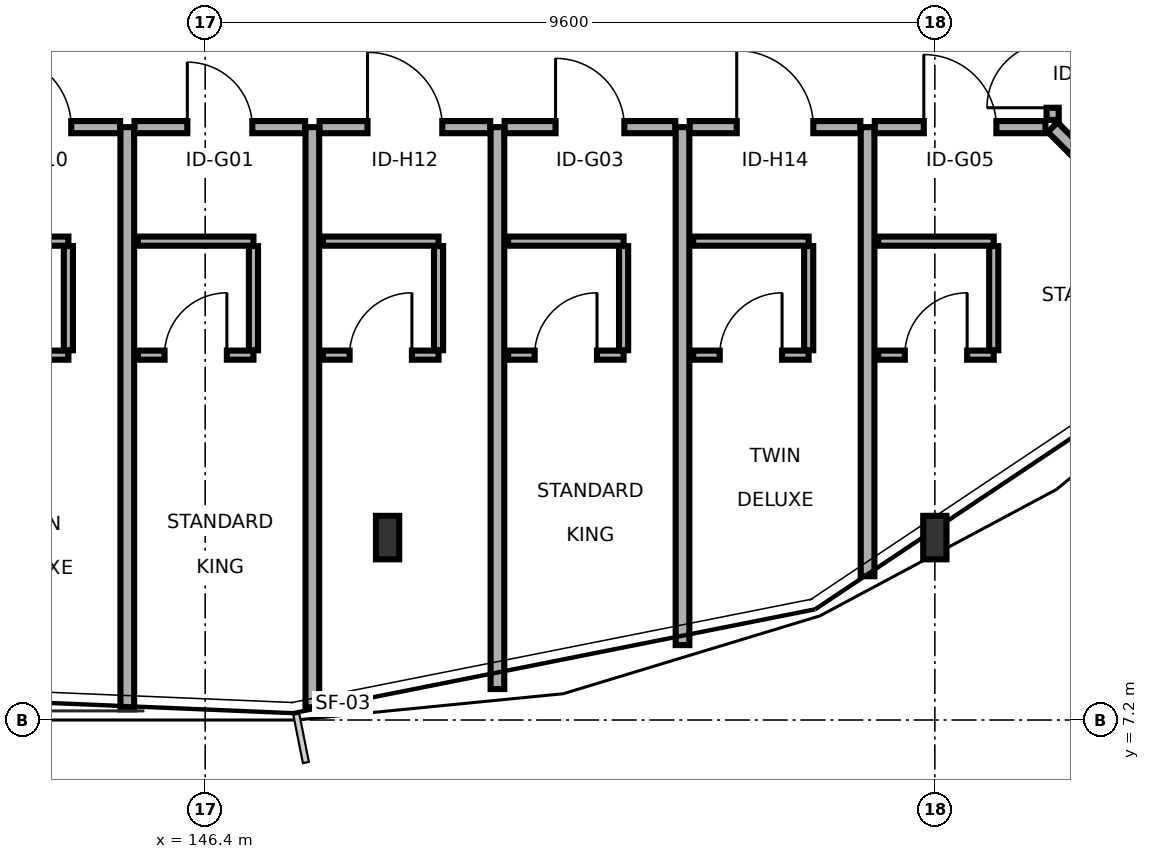
"""IFC4 building model, lengths in metres.
Left out: names, types, materials, properties, quantities, classifications, styles, units other than length and angle.
Written with IfcOpenShell. Run it as: python <this file> out.ifc"""

import sys

from ifc_helpers import new_model, si_unit, direction, frame, frame_2d, origin, origin_2d, place, context, subcontext, project, spatial, rectangle, i_section, extrude, element, fill, save


model = new_model("IFC4")
c1 = context("Model", 3, precision=1e-05, world=origin(), true_north=direction((0.0, 1.0)))
c2 = subcontext(c1, "Body", "Model", "MODEL_VIEW")
j1 = project(units=[si_unit("LENGTHUNIT", "METRE"), si_unit("PLANEANGLEUNIT", "RADIAN")], contexts=[c1])
p1 = place(None, origin())
s1 = spatial("IfcSite", under=j1, at=p1, CompositionType="ELEMENT")
p2 = place(p1, origin())
s2 = spatial("IfcBuilding", under=s1, at=p2, CompositionType="ELEMENT")
p3 = place(p2, frame((0.0, 0.0, 14.7)))
s3 = spatial("IfcBuildingStorey", under=s2, at=p3, CompositionType="ELEMENT", Elevation=14.7)
for number, where, z_axis, x_axis in (
    (1, (148.8, 9.6, 0.0), (0.0, 0.0, 1.0), (1.0, 0.0, 0.0)),
    (2, (156.0, 9.6, 0.0), (0.0, 0.0, 1.0), (1.0, 0.0, 0.0)),
):
    element("IfcColumn", number, at=place(p3, frame(where, z_axis=z_axis, x_axis=x_axis)), inside=s3, PredefinedType="COLUMN", context=c2, shape_type="SweptSolid", body=[
        extrude(i_section(OverallWidth=0.306, OverallDepth=0.572, WebThickness=0.021, FlangeThickness=0.04, FilletRadius=0.027, at=origin_2d()), origin(), (0.0, 0.0, 1.0), 3.4),
    ])
p4 = place(p3, frame((143.035, 15.0, 0.0), z_axis=(0.0, 0.0, 1.0), x_axis=(1.0, 0.0, 0.0)))
e3 = element("IfcWall", 3, at=p4, inside=s3, PredefinedType="PARTITIONING", context=c2, shape_type="SweptSolid", body=[
    extrude(rectangle(XDim=2.245, YDim=0.16, at=frame_2d((1.123, 0.0))), origin(), (0.0, 0.0, 1.0), 3.215),
])
p5 = place(p4, frame((0.643, 0.0, 0.0)))
e4 = element("IfcOpeningElement", 4, at=p5, cuts=e3, PredefinedType="OPENING", context=c2, shape_type="SweptSolid", body=[
    extrude(rectangle(XDim=0.96, YDim=2.13, at=frame_2d((0.48, 1.065))), frame((0.0, 0.09, 0.0), z_axis=(0.0, -1.0, 0.0), x_axis=(1.0, 0.0, 0.0)), (0.0, 0.0, 1.0), 0.18),
])
p6 = place(p3, frame((143.08, 12.0, 0.0), z_axis=(0.0, 0.0, 1.0), x_axis=(1.0, 0.0, 0.0)))
e5 = element("IfcWall", 5, at=p6, inside=s3, PredefinedType="PARTITIONING", context=c2, shape_type="SweptSolid", body=[
    extrude(rectangle(XDim=1.52, YDim=0.12, at=frame_2d((0.76, 0.0))), origin(), (0.0, 0.0, 1.0), 3.215),
])
p7 = place(p6, frame((0.35, 0.0, 0.0)))
e6 = element("IfcOpeningElement", 6, at=p7, cuts=e5, PredefinedType="OPENING", context=c2, shape_type="SweptSolid", body=[
    extrude(rectangle(XDim=0.82, YDim=2.08, at=frame_2d((0.41, 1.04))), frame((0.0, 0.07, 0.0), z_axis=(0.0, -1.0, 0.0), x_axis=(1.0, 0.0, 0.0)), (0.0, 0.0, 1.0), 0.14),
])
p8 = place(p3, frame((143.08, 13.5, 0.0), z_axis=(0.0, 0.0, 1.0), x_axis=(1.0, 0.0, 0.0)))
e7 = element("IfcWall", 7, at=p8, inside=s3, PredefinedType="PARTITIONING", context=c2, shape_type="SweptSolid", body=[
    extrude(rectangle(XDim=1.52, YDim=0.12, at=frame_2d((0.76, 0.0))), origin(), (0.0, 0.0, 1.0), 3.215),
])
p9 = place(p3, frame((144.6, 12.065, 0.0), z_axis=(0.0, 0.0, 1.0), x_axis=(0.0, 1.0, 0.0)))
e8 = element("IfcWall", 8, at=p9, inside=s3, PredefinedType="PARTITIONING", context=c2, shape_type="SweptSolid", body=[
    extrude(rectangle(XDim=1.37, YDim=0.12, at=frame_2d((0.685, 0.0))), origin(), (0.0, 0.0, 1.0), 3.215),
])
p10 = place(p3, frame((145.375, 7.34, 0.0), z_axis=(0.0, 0.0, 1.0), x_axis=(0.0, 1.0, 0.0)))
e9 = element("IfcWall", 9, at=p10, inside=s3, PredefinedType="PARTITIONING", context=c2, shape_type="SweptSolid", body=[
    extrude(rectangle(XDim=7.66, YDim=0.18, at=frame_2d((3.83, 0.0))), origin(), (0.0, 0.0, 1.0), 2.76),
])
p11 = place(p3, frame((145.47, 15.0, 0.0), z_axis=(0.0, 0.0, 1.0), x_axis=(1.0, 0.0, 0.0)))
e10 = element("IfcWall", 10, at=p11, inside=s3, PredefinedType="PARTITIONING", context=c2, shape_type="SweptSolid", body=[
    extrude(rectangle(XDim=2.245, YDim=0.16, at=frame_2d((1.123, 0.0))), origin(), (0.0, 0.0, 1.0), 3.215),
])
p12 = place(p11, frame((0.695, 0.0, 0.0)))
e11 = element("IfcOpeningElement", 11, at=p12, cuts=e10, PredefinedType="OPENING", context=c2, shape_type="SweptSolid", body=[
    extrude(rectangle(XDim=0.855, YDim=2.05, at=frame_2d((0.427, 1.025))), frame((0.0, 0.09, 0.0), z_axis=(0.0, -1.0, 0.0), x_axis=(1.0, 0.0, 0.0)), (0.0, 0.0, 1.0), 0.18),
])
p13 = place(p3, frame((145.515, 12.0, 0.0), z_axis=(0.0, 0.0, 1.0), x_axis=(1.0, 0.0, 0.0)))
e12 = element("IfcWall", 12, at=p13, inside=s3, PredefinedType="PARTITIONING", context=c2, shape_type="SweptSolid", body=[
    extrude(rectangle(XDim=1.52, YDim=0.12, at=frame_2d((0.76, 0.0))), origin(), (0.0, 0.0, 1.0), 3.215),
])
p14 = place(p13, frame((0.35, 0.0, 0.0)))
e13 = element("IfcOpeningElement", 13, at=p14, cuts=e12, PredefinedType="OPENING", context=c2, shape_type="SweptSolid", body=[
    extrude(rectangle(XDim=0.82, YDim=2.08, at=frame_2d((0.41, 1.04))), frame((0.0, 0.07, 0.0), z_axis=(0.0, -1.0, 0.0), x_axis=(1.0, 0.0, 0.0)), (0.0, 0.0, 1.0), 0.14),
])
p15 = place(p3, frame((145.515, 13.5, 0.0), z_axis=(0.0, 0.0, 1.0), x_axis=(1.0, 0.0, 0.0)))
e14 = element("IfcWall", 14, at=p15, inside=s3, PredefinedType="PARTITIONING", context=c2, shape_type="SweptSolid", body=[
    extrude(rectangle(XDim=1.52, YDim=0.12, at=frame_2d((0.76, 0.0))), origin(), (0.0, 0.0, 1.0), 3.215),
])
p16 = place(p3, frame((147.035, 12.065, 0.0), z_axis=(0.0, 0.0, 1.0), x_axis=(0.0, 1.0, 0.0)))
e15 = element("IfcWall", 15, at=p16, inside=s3, PredefinedType="PARTITIONING", context=c2, shape_type="SweptSolid", body=[
    extrude(rectangle(XDim=1.37, YDim=0.12, at=frame_2d((0.685, 0.0))), origin(), (0.0, 0.0, 1.0), 3.215),
])
p17 = place(p3, frame((147.81, 7.368, 0.0), z_axis=(0.0, 0.0, 1.0), x_axis=(0.0, 1.0, 0.0)))
e16 = element("IfcWall", 16, at=p17, inside=s3, PredefinedType="PARTITIONING", context=c2, shape_type="SweptSolid", body=[
    extrude(rectangle(XDim=7.632, YDim=0.18, at=frame_2d((3.816, 0.0))), origin(), (0.0, 0.0, 1.0), 2.76),
])
p18 = place(p3, frame((147.905, 15.0, 0.0), z_axis=(0.0, 0.0, 1.0), x_axis=(1.0, 0.0, 0.0)))
e17 = element("IfcWall", 17, at=p18, inside=s3, PredefinedType="PARTITIONING", context=c2, shape_type="SweptSolid", body=[
    extrude(rectangle(XDim=2.245, YDim=0.16, at=frame_2d((1.123, 0.0))), origin(), (0.0, 0.0, 1.0), 2.75),
])
p19 = place(p18, frame((0.631, 0.0, 0.0)))
e18 = element("IfcOpeningElement", 18, at=p19, cuts=e17, PredefinedType="OPENING", context=c2, shape_type="SweptSolid", body=[
    extrude(rectangle(XDim=0.984, YDim=2.07, at=frame_2d((0.492, 1.035))), frame((0.0, 0.09, 0.0), z_axis=(0.0, -1.0, 0.0), x_axis=(1.0, 0.0, 0.0)), (0.0, 0.0, 1.0), 0.18),
])
p20 = place(p3, frame((147.95, 12.0, 0.0), z_axis=(0.0, 0.0, 1.0), x_axis=(1.0, 0.0, 0.0)))
e19 = element("IfcWall", 19, at=p20, inside=s3, PredefinedType="PARTITIONING", context=c2, shape_type="SweptSolid", body=[
    extrude(rectangle(XDim=1.52, YDim=0.12, at=frame_2d((0.76, 0.0))), origin(), (0.0, 0.0, 1.0), 2.75),
])
p21 = place(p20, frame((0.35, 0.0, 0.0)))
e20 = element("IfcOpeningElement", 20, at=p21, cuts=e19, PredefinedType="OPENING", context=c2, shape_type="SweptSolid", body=[
    extrude(rectangle(XDim=0.82, YDim=2.08, at=frame_2d((0.41, 1.04))), frame((0.0, 0.07, 0.0), z_axis=(0.0, -1.0, 0.0), x_axis=(1.0, 0.0, 0.0)), (0.0, 0.0, 1.0), 0.14),
])
p22 = place(p3, frame((147.95, 13.5, 0.0), z_axis=(0.0, 0.0, 1.0), x_axis=(1.0, 0.0, 0.0)))
e21 = element("IfcWall", 21, at=p22, inside=s3, PredefinedType="PARTITIONING", context=c2, shape_type="SweptSolid", body=[
    extrude(rectangle(XDim=1.52, YDim=0.12, at=frame_2d((0.76, 0.0))), origin(), (0.0, 0.0, 1.0), 2.75),
])
p23 = place(p3, frame((149.47, 12.065, 0.0), z_axis=(0.0, 0.0, 1.0), x_axis=(0.0, 1.0, 0.0)))
e22 = element("IfcWall", 22, at=p23, inside=s3, PredefinedType="PARTITIONING", context=c2, shape_type="SweptSolid", body=[
    extrude(rectangle(XDim=1.37, YDim=0.12, at=frame_2d((0.685, 0.0))), origin(), (0.0, 0.0, 1.0), 3.215),
])
p24 = place(p3, frame((150.245, 7.607, 0.0), z_axis=(0.0, 0.0, 1.0), x_axis=(0.0, 1.0, 0.0)))
e23 = element("IfcWall", 23, at=p24, inside=s3, PredefinedType="PARTITIONING", context=c2, shape_type="SweptSolid", body=[
    extrude(rectangle(XDim=7.393, YDim=0.18, at=frame_2d((3.696, 0.0))), origin(), (0.0, 0.0, 1.0), 2.76),
])
p25 = place(p3, frame((150.34, 15.0, 0.0), z_axis=(0.0, 0.0, 1.0), x_axis=(1.0, 0.0, 0.0)))
e24 = element("IfcWall", 24, at=p25, inside=s3, PredefinedType="PARTITIONING", context=c2, shape_type="SweptSolid", body=[
    extrude(rectangle(XDim=2.245, YDim=0.16, at=frame_2d((1.123, 0.0))), origin(), (0.0, 0.0, 1.0), 3.215),
])
p26 = place(p25, frame((0.67, 0.0, 0.0)))
e25 = element("IfcOpeningElement", 25, at=p26, cuts=e24, PredefinedType="OPENING", context=c2, shape_type="SweptSolid", body=[
    extrude(rectangle(XDim=0.905, YDim=2.05, at=frame_2d((0.453, 1.025))), frame((0.0, 0.09, 0.0), z_axis=(0.0, -1.0, 0.0), x_axis=(1.0, 0.0, 0.0)), (0.0, 0.0, 1.0), 0.18),
])
p27 = place(p3, frame((150.385, 12.0, 0.0), z_axis=(0.0, 0.0, 1.0), x_axis=(1.0, 0.0, 0.0)))
e26 = element("IfcWall", 26, at=p27, inside=s3, PredefinedType="PARTITIONING", context=c2, shape_type="SweptSolid", body=[
    extrude(rectangle(XDim=1.52, YDim=0.12, at=frame_2d((0.76, 0.0))), origin(), (0.0, 0.0, 1.0), 3.215),
])
p28 = place(p27, frame((0.35, 0.0, 0.0)))
e27 = element("IfcOpeningElement", 27, at=p28, cuts=e26, PredefinedType="OPENING", context=c2, shape_type="SweptSolid", body=[
    extrude(rectangle(XDim=0.82, YDim=2.08, at=frame_2d((0.41, 1.04))), frame((0.0, 0.07, 0.0), z_axis=(0.0, -1.0, 0.0), x_axis=(1.0, 0.0, 0.0)), (0.0, 0.0, 1.0), 0.14),
])
p29 = place(p3, frame((150.385, 13.5, 0.0), z_axis=(0.0, 0.0, 1.0), x_axis=(1.0, 0.0, 0.0)))
e28 = element("IfcWall", 28, at=p29, inside=s3, PredefinedType="PARTITIONING", context=c2, shape_type="SweptSolid", body=[
    extrude(rectangle(XDim=1.52, YDim=0.12, at=frame_2d((0.76, 0.0))), origin(), (0.0, 0.0, 1.0), 3.215),
])
p30 = place(p3, frame((151.905, 12.065, 0.0), z_axis=(0.0, 0.0, 1.0), x_axis=(0.0, 1.0, 0.0)))
e29 = element("IfcWall", 29, at=p30, inside=s3, PredefinedType="PARTITIONING", context=c2, shape_type="SweptSolid", body=[
    extrude(rectangle(XDim=1.37, YDim=0.12, at=frame_2d((0.685, 0.0))), origin(), (0.0, 0.0, 1.0), 3.215),
])
p31 = place(p3, frame((152.68, 8.186, 0.0), z_axis=(0.0, 0.0, 1.0), x_axis=(0.0, 1.0, 0.0)))
e30 = element("IfcWall", 30, at=p31, inside=s3, PredefinedType="PARTITIONING", context=c2, shape_type="SweptSolid", body=[
    extrude(rectangle(XDim=6.814, YDim=0.18, at=frame_2d((3.407, 0.0))), origin(), (0.0, 0.0, 1.0), 2.76),
])
p32 = place(p3, frame((152.775, 15.0, 0.0), z_axis=(0.0, 0.0, 1.0), x_axis=(1.0, 0.0, 0.0)))
e31 = element("IfcWall", 31, at=p32, inside=s3, PredefinedType="PARTITIONING", context=c2, shape_type="SweptSolid", body=[
    extrude(rectangle(XDim=2.245, YDim=0.16, at=frame_2d((1.123, 0.0))), origin(), (0.0, 0.0, 1.0), 3.215),
])
p33 = place(p32, frame((0.618, 0.0, 0.0)))
e32 = element("IfcOpeningElement", 32, at=p33, cuts=e31, PredefinedType="OPENING", context=c2, shape_type="SweptSolid", body=[
    extrude(rectangle(XDim=1.008, YDim=2.13, at=frame_2d((0.504, 1.065))), frame((0.0, 0.09, 0.0), z_axis=(0.0, -1.0, 0.0), x_axis=(1.0, 0.0, 0.0)), (0.0, 0.0, 1.0), 0.18),
])
p34 = place(p3, frame((152.82, 12.0, 0.0), z_axis=(0.0, 0.0, 1.0), x_axis=(1.0, 0.0, 0.0)))
e33 = element("IfcWall", 33, at=p34, inside=s3, PredefinedType="PARTITIONING", context=c2, shape_type="SweptSolid", body=[
    extrude(rectangle(XDim=1.52, YDim=0.12, at=frame_2d((0.76, 0.0))), origin(), (0.0, 0.0, 1.0), 3.215),
])
p35 = place(p34, frame((0.35, 0.0, 0.0)))
e34 = element("IfcOpeningElement", 34, at=p35, cuts=e33, PredefinedType="OPENING", context=c2, shape_type="SweptSolid", body=[
    extrude(rectangle(XDim=0.82, YDim=2.08, at=frame_2d((0.41, 1.04))), frame((0.0, 0.07, 0.0), z_axis=(0.0, -1.0, 0.0), x_axis=(1.0, 0.0, 0.0)), (0.0, 0.0, 1.0), 0.14),
])
p36 = place(p3, frame((152.82, 13.5, 0.0), z_axis=(0.0, 0.0, 1.0), x_axis=(1.0, 0.0, 0.0)))
e35 = element("IfcWall", 35, at=p36, inside=s3, PredefinedType="PARTITIONING", context=c2, shape_type="SweptSolid", body=[
    extrude(rectangle(XDim=1.52, YDim=0.12, at=frame_2d((0.76, 0.0))), origin(), (0.0, 0.0, 1.0), 3.215),
])
p37 = place(p3, frame((154.34, 12.065, 0.0), z_axis=(0.0, 0.0, 1.0), x_axis=(0.0, 1.0, 0.0)))
e36 = element("IfcWall", 36, at=p37, inside=s3, PredefinedType="PARTITIONING", context=c2, shape_type="SweptSolid", body=[
    extrude(rectangle(XDim=1.37, YDim=0.12, at=frame_2d((0.685, 0.0))), origin(), (0.0, 0.0, 1.0), 3.215),
])
p38 = place(p3, frame((155.115, 9.092, 0.0), z_axis=(0.0, 0.0, 1.0), x_axis=(0.0, 1.0, 0.0)))
e37 = element("IfcWall", 37, at=p38, inside=s3, PredefinedType="PARTITIONING", context=c2, shape_type="SweptSolid", body=[
    extrude(rectangle(XDim=5.908, YDim=0.18, at=frame_2d((2.954, 0.0))), origin(), (0.0, 0.0, 1.0), 2.76),
])
p39 = place(p3, frame((155.21, 15.0, 0.0), z_axis=(0.0, 0.0, 1.0), x_axis=(1.0, 0.0, 0.0)))
e38 = element("IfcWall", 38, at=p39, inside=s3, PredefinedType="PARTITIONING", context=c2, shape_type="SweptSolid", body=[
    extrude(rectangle(XDim=2.245, YDim=0.16, at=frame_2d((1.123, 0.0))), origin(), (0.0, 0.0, 1.0), 2.75),
])
p40 = place(p39, frame((0.645, 0.0, 0.0)))
e39 = element("IfcOpeningElement", 39, at=p40, cuts=e38, PredefinedType="OPENING", context=c2, shape_type="SweptSolid", body=[
    extrude(rectangle(XDim=0.955, YDim=2.05, at=frame_2d((0.478, 1.025))), frame((0.0, 0.09, 0.0), z_axis=(0.0, -1.0, 0.0), x_axis=(1.0, 0.0, 0.0)), (0.0, 0.0, 1.0), 0.18),
])
p41 = place(p3, frame((155.255, 12.0, 0.0), z_axis=(0.0, 0.0, 1.0), x_axis=(1.0, 0.0, 0.0)))
e40 = element("IfcWall", 40, at=p41, inside=s3, PredefinedType="PARTITIONING", context=c2, shape_type="SweptSolid", body=[
    extrude(rectangle(XDim=1.52, YDim=0.12, at=frame_2d((0.76, 0.0))), origin(), (0.0, 0.0, 1.0), 2.75),
])
p42 = place(p41, frame((0.35, 0.0, 0.0)))
e41 = element("IfcOpeningElement", 41, at=p42, cuts=e40, PredefinedType="OPENING", context=c2, shape_type="SweptSolid", body=[
    extrude(rectangle(XDim=0.82, YDim=2.08, at=frame_2d((0.41, 1.04))), frame((0.0, 0.07, 0.0), z_axis=(0.0, -1.0, 0.0), x_axis=(1.0, 0.0, 0.0)), (0.0, 0.0, 1.0), 0.14),
])
p43 = place(p3, frame((155.255, 13.5, 0.0), z_axis=(0.0, 0.0, 1.0), x_axis=(1.0, 0.0, 0.0)))
e42 = element("IfcWall", 42, at=p43, inside=s3, PredefinedType="PARTITIONING", context=c2, shape_type="SweptSolid", body=[
    extrude(rectangle(XDim=1.52, YDim=0.12, at=frame_2d((0.76, 0.0))), origin(), (0.0, 0.0, 1.0), 2.75),
])
p44 = place(p3, frame((156.775, 12.065, 0.0), z_axis=(0.0, 0.0, 1.0), x_axis=(0.0, 1.0, 0.0)))
e43 = element("IfcWall", 43, at=p44, inside=s3, PredefinedType="PARTITIONING", context=c2, shape_type="SweptSolid", body=[
    extrude(rectangle(XDim=1.37, YDim=0.12, at=frame_2d((0.685, 0.0))), origin(), (0.0, 0.0, 1.0), 3.215),
])
p45 = place(p3, frame((157.55, 15.0, 0.0), z_axis=(0.0, 0.0, 1.0), x_axis=(0.707106781187, -0.707106781187, 0.0)))
e44 = element("IfcWall", 44, at=p45, inside=s3, PredefinedType="PARTITIONING", context=c2, shape_type="SweptSolid", body=[
    extrude(rectangle(XDim=3.565, YDim=0.18, at=frame_2d((1.783, 0.0))), origin(), (0.0, 0.0, 1.0), 2.76),
])
p46 = place(p3, frame((157.55, 15.095, 0.0), z_axis=(0.0, 0.0, 1.0), x_axis=(0.0, 1.0, 0.0)))
e45 = element("IfcWall", 45, at=p46, inside=s3, PredefinedType="PARTITIONING", context=c2, shape_type="SweptSolid", body=[
    extrude(rectangle(XDim=2.33, YDim=0.16, at=frame_2d((1.165, 0.0))), origin(), (0.0, 0.0, 1.0), 2.75),
])
p47 = place(p46, frame((0.16, 0.0, 0.0)))
e46 = element("IfcOpeningElement", 46, at=p47, cuts=e45, PredefinedType="OPENING", context=c2, shape_type="SweptSolid", body=[
    extrude(rectangle(XDim=0.864, YDim=2.13, at=frame_2d((0.432, 1.065))), frame((0.0, 0.09, 0.0), z_axis=(0.0, -1.0, 0.0), x_axis=(1.0, 0.0, 0.0)), (0.0, 0.0, 1.0), 0.18),
])
p48 = place(p5, origin())
e47 = element("IfcDoor", 47, at=p48, inside=s3, OperationType="SINGLE_SWING_LEFT", PredefinedType="DOOR", context=c2, shape_type="SweptSolid", body=[
    extrude(rectangle(XDim=0.96, YDim=2.13, at=frame_2d((0.48, 1.065))), frame((0.0, 0.025, 0.0), z_axis=(0.0, -1.0, 0.0), x_axis=(1.0, 0.0, 0.0)), (0.0, 0.0, 1.0), 0.05),
])
fill(e4, e47)
p49 = place(p12, origin())
e48 = element("IfcDoor", 48, at=p49, inside=s3, OperationType="SINGLE_SWING_LEFT", PredefinedType="DOOR", context=c2, shape_type="SweptSolid", body=[
    extrude(rectangle(XDim=0.855, YDim=2.05, at=frame_2d((0.427, 1.025))), frame((0.0, 0.025, 0.0), z_axis=(0.0, -1.0, 0.0), x_axis=(1.0, 0.0, 0.0)), (0.0, 0.0, 1.0), 0.05),
])
fill(e11, e48)
p50 = place(p14, origin())
e49 = element("IfcDoor", 49, at=p50, inside=s3, OperationType="SINGLE_SWING_RIGHT", PredefinedType="DOOR", context=c2, shape_type="SweptSolid", body=[
    extrude(rectangle(XDim=0.82, YDim=2.08, at=frame_2d((0.41, 1.04))), frame((0.0, 0.025, 0.0), z_axis=(0.0, -1.0, 0.0), x_axis=(1.0, 0.0, 0.0)), (0.0, 0.0, 1.0), 0.05),
])
fill(e13, e49)
p51 = place(p19, origin())
e50 = element("IfcDoor", 50, at=p51, inside=s3, OperationType="SINGLE_SWING_LEFT", PredefinedType="DOOR", context=c2, shape_type="SweptSolid", body=[
    extrude(rectangle(XDim=0.984, YDim=2.07, at=frame_2d((0.492, 1.035))), frame((0.0, 0.025, 0.0), z_axis=(0.0, -1.0, 0.0), x_axis=(1.0, 0.0, 0.0)), (0.0, 0.0, 1.0), 0.05),
])
fill(e18, e50)
p52 = place(p21, origin())
e51 = element("IfcDoor", 51, at=p52, inside=s3, OperationType="SINGLE_SWING_RIGHT", PredefinedType="DOOR", context=c2, shape_type="SweptSolid", body=[
    extrude(rectangle(XDim=0.82, YDim=2.08, at=frame_2d((0.41, 1.04))), frame((0.0, 0.025, 0.0), z_axis=(0.0, -1.0, 0.0), x_axis=(1.0, 0.0, 0.0)), (0.0, 0.0, 1.0), 0.05),
])
fill(e20, e51)
p53 = place(p26, origin())
e52 = element("IfcDoor", 52, at=p53, inside=s3, OperationType="SINGLE_SWING_LEFT", PredefinedType="DOOR", context=c2, shape_type="SweptSolid", body=[
    extrude(rectangle(XDim=0.905, YDim=2.05, at=frame_2d((0.453, 1.025))), frame((0.0, 0.025, 0.0), z_axis=(0.0, -1.0, 0.0), x_axis=(1.0, 0.0, 0.0)), (0.0, 0.0, 1.0), 0.05),
])
fill(e25, e52)
p54 = place(p28, origin())
e53 = element("IfcDoor", 53, at=p54, inside=s3, OperationType="SINGLE_SWING_RIGHT", PredefinedType="DOOR", context=c2, shape_type="SweptSolid", body=[
    extrude(rectangle(XDim=0.82, YDim=2.08, at=frame_2d((0.41, 1.04))), frame((0.0, 0.025, 0.0), z_axis=(0.0, -1.0, 0.0), x_axis=(1.0, 0.0, 0.0)), (0.0, 0.0, 1.0), 0.05),
])
fill(e27, e53)
p55 = place(p33, origin())
e54 = element("IfcDoor", 54, at=p55, inside=s3, OperationType="SINGLE_SWING_LEFT", PredefinedType="DOOR", context=c2, shape_type="SweptSolid", body=[
    extrude(rectangle(XDim=1.008, YDim=2.13, at=frame_2d((0.504, 1.065))), frame((0.0, 0.025, 0.0), z_axis=(0.0, -1.0, 0.0), x_axis=(1.0, 0.0, 0.0)), (0.0, 0.0, 1.0), 0.05),
])
fill(e32, e54)
p56 = place(p35, origin())
e55 = element("IfcDoor", 55, at=p56, inside=s3, OperationType="SINGLE_SWING_RIGHT", PredefinedType="DOOR", context=c2, shape_type="SweptSolid", body=[
    extrude(rectangle(XDim=0.82, YDim=2.08, at=frame_2d((0.41, 1.04))), frame((0.0, 0.025, 0.0), z_axis=(0.0, -1.0, 0.0), x_axis=(1.0, 0.0, 0.0)), (0.0, 0.0, 1.0), 0.05),
])
fill(e34, e55)
p57 = place(p40, origin())
e56 = element("IfcDoor", 56, at=p57, inside=s3, OperationType="SINGLE_SWING_LEFT", PredefinedType="DOOR", context=c2, shape_type="SweptSolid", body=[
    extrude(rectangle(XDim=0.955, YDim=2.05, at=frame_2d((0.478, 1.025))), frame((0.0, 0.025, 0.0), z_axis=(0.0, -1.0, 0.0), x_axis=(1.0, 0.0, 0.0)), (0.0, 0.0, 1.0), 0.05),
])
fill(e39, e56)
p58 = place(p42, origin())
e57 = element("IfcDoor", 57, at=p58, inside=s3, OperationType="SINGLE_SWING_RIGHT", PredefinedType="DOOR", context=c2, shape_type="SweptSolid", body=[
    extrude(rectangle(XDim=0.82, YDim=2.08, at=frame_2d((0.41, 1.04))), frame((0.0, 0.025, 0.0), z_axis=(0.0, -1.0, 0.0), x_axis=(1.0, 0.0, 0.0)), (0.0, 0.0, 1.0), 0.05),
])
fill(e41, e57)
p59 = place(p47, origin())
e58 = element("IfcDoor", 58, at=p59, inside=s3, OperationType="SINGLE_SWING_LEFT", PredefinedType="DOOR", context=c2, shape_type="SweptSolid", body=[
    extrude(rectangle(XDim=0.864, YDim=2.13, at=frame_2d((0.432, 1.065))), frame((0.0, 0.025, 0.0), z_axis=(0.0, -1.0, 0.0), x_axis=(1.0, 0.0, 0.0)), (0.0, 0.0, 1.0), 0.05),
])
fill(e46, e58)
save(model, sys.argv[1])
